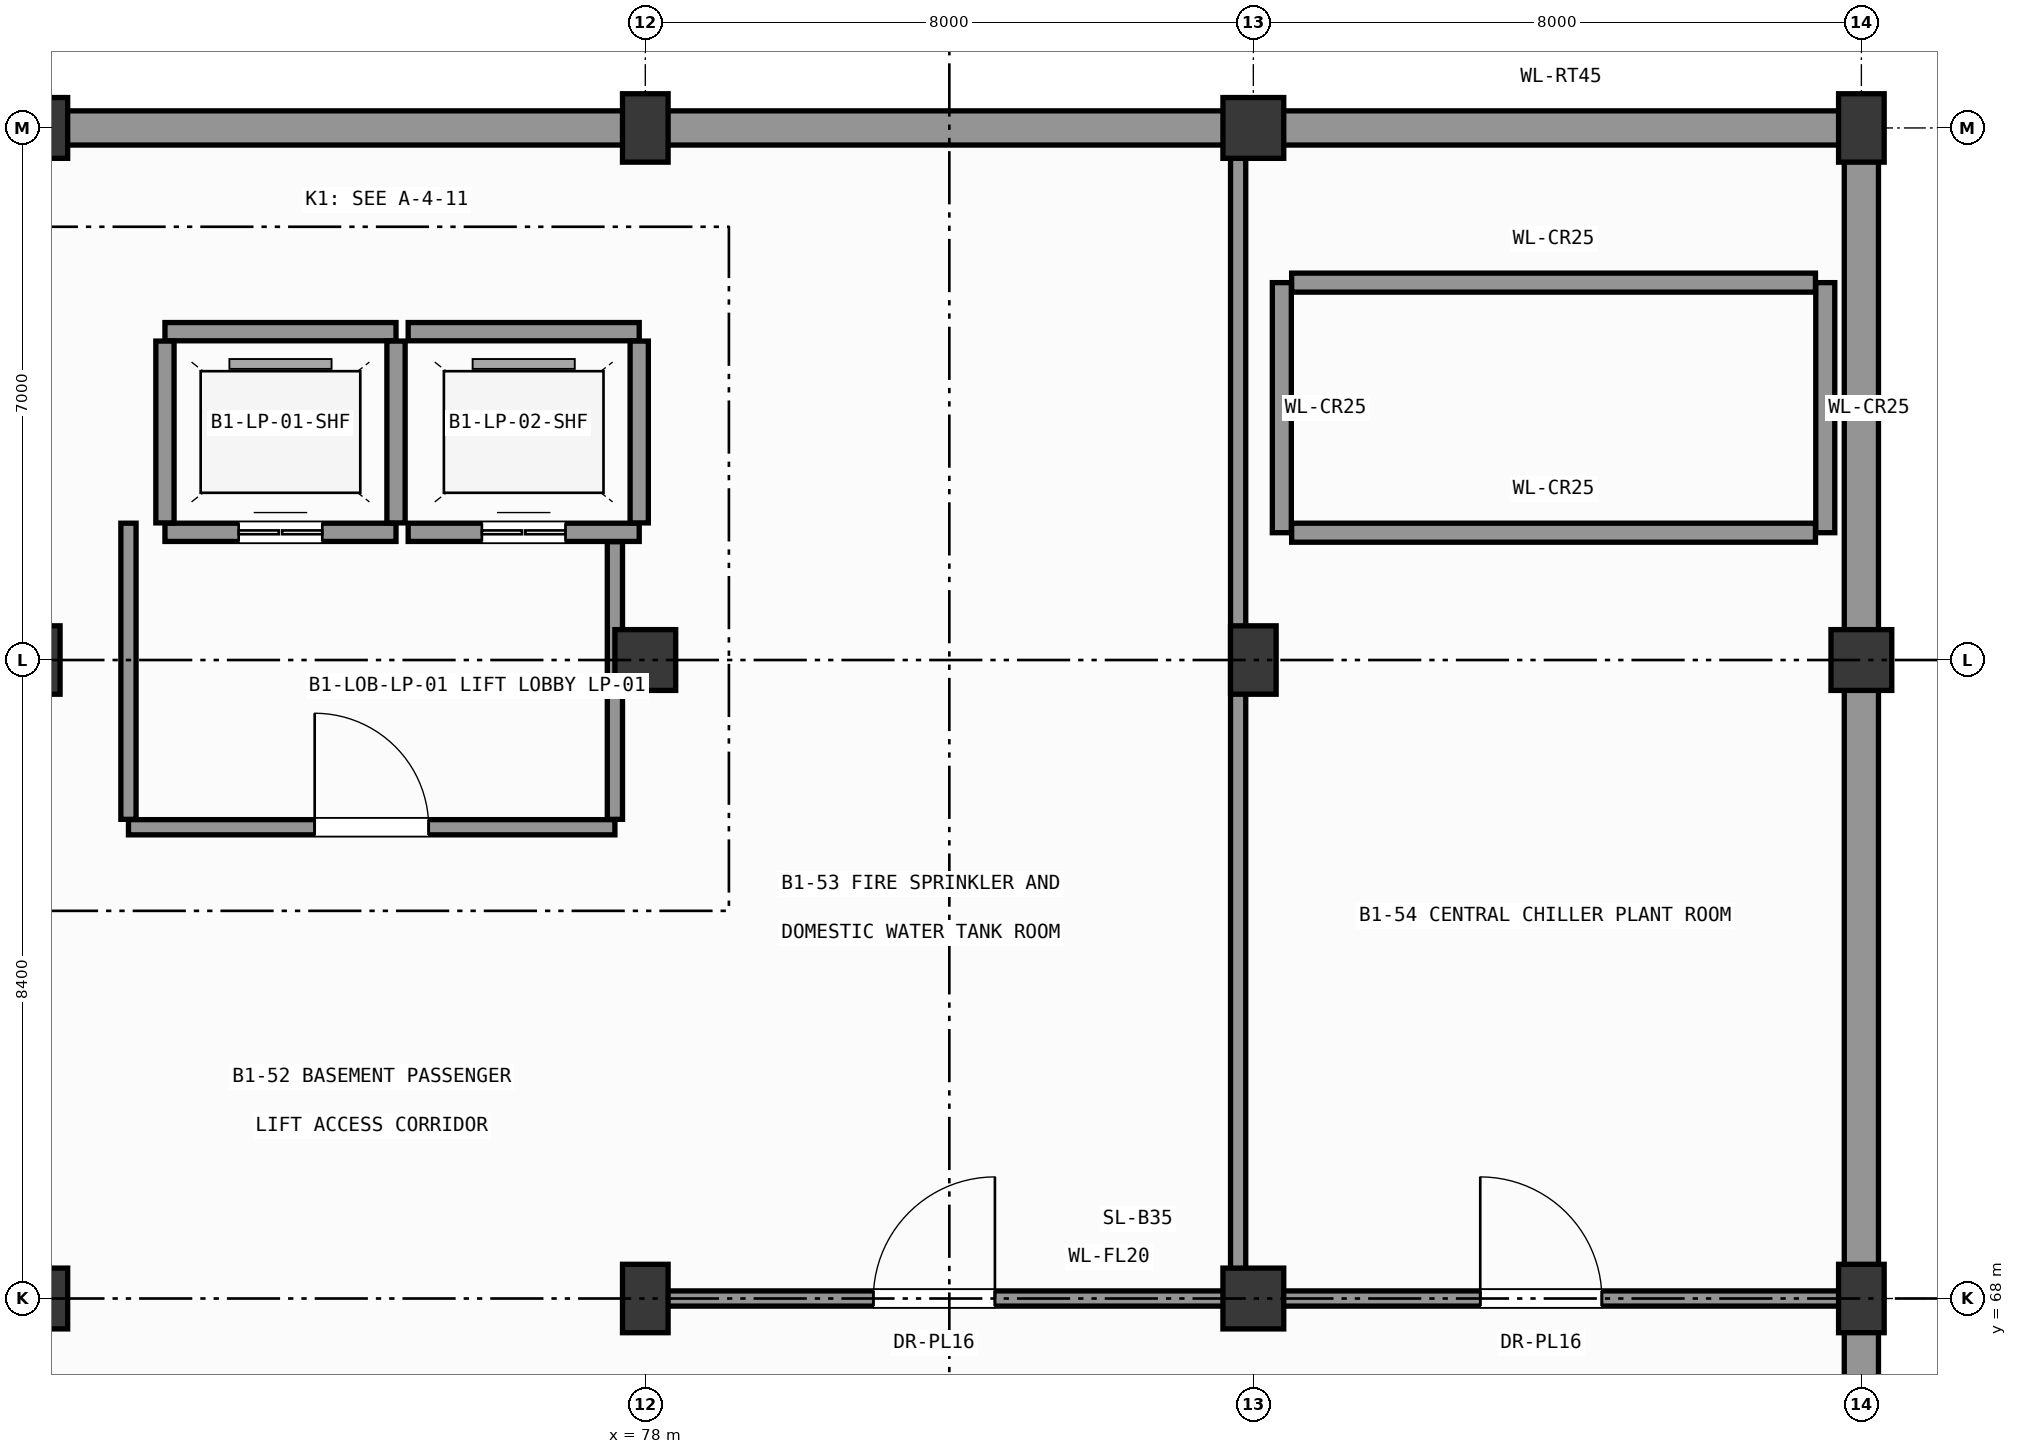
"""IFC4 building model, lengths in metres.
Left out: names, types, materials, properties, quantities, classifications, styles, units other than length and angle.
Written with IfcOpenShell. Run it as: python <this file> out.ifc"""

import sys

from ifc_helpers import new_model, si_unit, direction, frame, frame_2d, origin, origin_2d, place, context, subcontext, project, spatial, rectangle, extrude, element, fill, save


model = new_model("IFC4")
c1 = context("Model", 3, precision=1e-05, world=origin(), true_north=direction((0.0, 1.0)))
c2 = subcontext(c1, "Body", "Model", "MODEL_VIEW")
j1 = project(units=[si_unit("LENGTHUNIT", "METRE"), si_unit("PLANEANGLEUNIT", "RADIAN")], contexts=[c1])
p1 = place(None, origin())
s1 = spatial("IfcSite", under=j1, at=p1, CompositionType="ELEMENT")
p2 = place(p1, origin())
s2 = spatial("IfcBuilding", under=s1, at=p2, CompositionType="ELEMENT")
p3 = place(p2, frame((0.0, 0.0, -4.8)))
s3 = spatial("IfcBuildingStorey", under=s2, at=p3, CompositionType="ELEMENT", Elevation=-4.8)
p4 = place(p3, frame((70.0, 68.0, 0.0), z_axis=(0.0, 0.0, 1.0), x_axis=(1.0, 0.0, 0.0)))
e1 = element("IfcColumn", 1, at=p4, inside=s3, PredefinedType="COLUMN", context=c2, shape_type="SweptSolid", body=[
    extrude(rectangle(XDim=0.8, YDim=0.8, at=origin_2d()), origin(), (0.0, 0.0, 1.0), 4.8),
])
p5 = place(p3, frame((70.0, 76.4, 0.0), z_axis=(0.0, 0.0, 1.0), x_axis=(1.0, 0.0, 0.0)))
e2 = element("IfcColumn", 2, at=p5, inside=s3, PredefinedType="COLUMN", context=c2, shape_type="SweptSolid", body=[
    extrude(rectangle(XDim=0.6, YDim=0.9, at=origin_2d()), origin(), (0.0, 0.0, 1.0), 4.8),
])
p6 = place(p3, frame((70.0, 83.4, 0.0), z_axis=(0.0, 0.0, 1.0), x_axis=(1.0, 0.0, 0.0)))
e3 = element("IfcColumn", 3, at=p6, inside=s3, PredefinedType="COLUMN", context=c2, shape_type="SweptSolid", body=[
    extrude(rectangle(XDim=0.8, YDim=0.8, at=origin_2d()), origin(), (0.0, 0.0, 1.0), 4.8),
])
p7 = place(p3, frame((78.0, 68.0, 0.0), z_axis=(0.0, 0.0, 1.0), x_axis=(1.0, 0.0, 0.0)))
e4 = element("IfcColumn", 4, at=p7, inside=s3, PredefinedType="COLUMN", context=c2, shape_type="SweptSolid", body=[
    extrude(rectangle(XDim=0.6, YDim=0.9, at=origin_2d()), origin(), (0.0, 0.0, 1.0), 4.8),
])
p8 = place(p3, frame((78.0, 76.4, 0.0), z_axis=(0.0, 0.0, 1.0), x_axis=(1.0, 0.0, 0.0)))
e5 = element("IfcColumn", 5, at=p8, inside=s3, PredefinedType="COLUMN", context=c2, shape_type="SweptSolid", body=[
    extrude(rectangle(XDim=0.8, YDim=0.8, at=origin_2d()), origin(), (0.0, 0.0, 1.0), 4.8),
])
p9 = place(p3, frame((78.0, 83.4, 0.0), z_axis=(0.0, 0.0, 1.0), x_axis=(1.0, 0.0, 0.0)))
e6 = element("IfcColumn", 6, at=p9, inside=s3, PredefinedType="COLUMN", context=c2, shape_type="SweptSolid", body=[
    extrude(rectangle(XDim=0.6, YDim=0.9, at=origin_2d()), origin(), (0.0, 0.0, 1.0), 4.8),
])
p10 = place(p3, frame((86.0, 68.0, 0.0), z_axis=(0.0, 0.0, 1.0), x_axis=(1.0, 0.0, 0.0)))
e7 = element("IfcColumn", 7, at=p10, inside=s3, PredefinedType="COLUMN", context=c2, shape_type="SweptSolid", body=[
    extrude(rectangle(XDim=0.8, YDim=0.8, at=origin_2d()), origin(), (0.0, 0.0, 1.0), 4.8),
])
p11 = place(p3, frame((86.0, 76.4, 0.0), z_axis=(0.0, 0.0, 1.0), x_axis=(1.0, 0.0, 0.0)))
e8 = element("IfcColumn", 8, at=p11, inside=s3, PredefinedType="COLUMN", context=c2, shape_type="SweptSolid", body=[
    extrude(rectangle(XDim=0.6, YDim=0.9, at=origin_2d()), origin(), (0.0, 0.0, 1.0), 4.8),
])
p12 = place(p3, frame((86.0, 83.4, 0.0), z_axis=(0.0, 0.0, 1.0), x_axis=(1.0, 0.0, 0.0)))
e9 = element("IfcColumn", 9, at=p12, inside=s3, PredefinedType="COLUMN", context=c2, shape_type="SweptSolid", body=[
    extrude(rectangle(XDim=0.8, YDim=0.8, at=origin_2d()), origin(), (0.0, 0.0, 1.0), 4.8),
])
p13 = place(p3, frame((94.0, 68.0, 0.0), z_axis=(0.0, 0.0, 1.0), x_axis=(1.0, 0.0, 0.0)))
e10 = element("IfcColumn", 10, at=p13, inside=s3, PredefinedType="COLUMN", context=c2, shape_type="SweptSolid", body=[
    extrude(rectangle(XDim=0.6, YDim=0.9, at=origin_2d()), origin(), (0.0, 0.0, 1.0), 4.8),
])
p14 = place(p3, frame((94.0, 76.4, 0.0), z_axis=(0.0, 0.0, 1.0), x_axis=(1.0, 0.0, 0.0)))
e11 = element("IfcColumn", 11, at=p14, inside=s3, PredefinedType="COLUMN", context=c2, shape_type="SweptSolid", body=[
    extrude(rectangle(XDim=0.8, YDim=0.8, at=origin_2d()), origin(), (0.0, 0.0, 1.0), 4.8),
])
p15 = place(p3, frame((94.0, 83.4, 0.0), z_axis=(0.0, 0.0, 1.0), x_axis=(1.0, 0.0, 0.0)))
e12 = element("IfcColumn", 12, at=p15, inside=s3, PredefinedType="COLUMN", context=c2, shape_type="SweptSolid", body=[
    extrude(rectangle(XDim=0.6, YDim=0.9, at=origin_2d()), origin(), (0.0, 0.0, 1.0), 4.8),
])
p16 = place(p3, frame((94.0, 68.0, 0.0), z_axis=(0.0, 0.0, 1.0), x_axis=(0.0, -1.0, 0.0)))
e13 = element("IfcWall", 13, at=p16, inside=s3, PredefinedType="USERDEFINED", context=c2, shape_type="SweptSolid", body=[
    extrude(rectangle(XDim=3.649, YDim=0.45, at=frame_2d((1.824, 0.0))), origin(), (0.0, 0.0, 1.0), 4.5),
])
p17 = place(p3, frame((94.0, 76.4, 0.0), z_axis=(0.0, 0.0, 1.0), x_axis=(0.0, -1.0, 0.0)))
e14 = element("IfcWall", 14, at=p17, inside=s3, PredefinedType="USERDEFINED", context=c2, shape_type="SweptSolid", body=[
    extrude(rectangle(XDim=8.4, YDim=0.45, at=frame_2d((4.2, 0.0))), origin(), (0.0, 0.0, 1.0), 4.5),
])
p18 = place(p3, frame((94.0, 83.4, 0.0), z_axis=(0.0, 0.0, 1.0), x_axis=(0.0, -1.0, 0.0)))
e15 = element("IfcWall", 15, at=p18, inside=s3, PredefinedType="USERDEFINED", context=c2, shape_type="SweptSolid", body=[
    extrude(rectangle(XDim=7.0, YDim=0.45, at=frame_2d((3.5, 0.0))), origin(), (0.0, 0.0, 1.0), 4.5),
])
p19 = place(p3, frame((86.0, 83.4, 0.0), z_axis=(0.0, 0.0, 1.0), x_axis=(1.0, 0.0, 0.0)))
e16 = element("IfcWall", 16, at=p19, inside=s3, PredefinedType="USERDEFINED", context=c2, shape_type="SweptSolid", body=[
    extrude(rectangle(XDim=7.771, YDim=0.45, at=frame_2d((3.885, 0.0))), origin(), (0.0, 0.0, 1.0), 4.5),
])
for number, where, z_axis, x_axis in (
    (17, (78.0, 83.4, 0.0), (0.0, 0.0, 1.0), (1.0, 0.0, 0.0)),
    (18, (70.0, 83.4, 0.0), (0.0, 0.0, 1.0), (1.0, 0.0, 0.0)),
):
    element("IfcWall", number, at=place(p3, frame(where, z_axis=z_axis, x_axis=x_axis)), inside=s3, PredefinedType="USERDEFINED", context=c2, shape_type="SweptSolid", body=[
        extrude(rectangle(XDim=8.0, YDim=0.45, at=frame_2d((4.0, 0.0))), origin(), (0.0, 0.0, 1.0), 4.5),
    ])
for number, where, z_axis, x_axis in (
    (19, (86.375, 78.075, 0.0), (0.0, 0.0, 1.0), (0.0, 1.0, 0.0)),
    (20, (93.525, 78.075, 0.0), (0.0, 0.0, 1.0), (0.0, 1.0, 0.0)),
):
    element("IfcWall", number, at=place(p3, frame(where, z_axis=z_axis, x_axis=x_axis)), inside=s3, PredefinedType="SHEAR", context=c2, shape_type="SweptSolid", body=[
        extrude(rectangle(XDim=3.29, YDim=0.25, at=frame_2d((1.645, 0.0))), origin(), (0.0, 0.0, 1.0), 4.5),
    ])
for number, where, z_axis, x_axis in (
    (21, (86.504, 78.075, 0.0), (0.0, 0.0, 1.0), (1.0, 0.0, 0.0)),
    (22, (86.504, 81.365, 0.0), (0.0, 0.0, 1.0), (1.0, 0.0, 0.0)),
):
    element("IfcWall", number, at=place(p3, frame(where, z_axis=z_axis, x_axis=x_axis)), inside=s3, PredefinedType="SHEAR", context=c2, shape_type="SweptSolid", body=[
        extrude(rectangle(XDim=6.892, YDim=0.25, at=frame_2d((3.446, 0.0))), origin(), (0.0, 0.0, 1.0), 4.5),
    ])
p20 = place(p3, frame((71.68, 78.08, 0.0), z_axis=(0.0, 0.0, 1.0), x_axis=(1.0, 0.0, 0.0)))
e23 = element("IfcWall", 23, at=p20, inside=s3, PredefinedType="SHEAR", context=c2, shape_type="SweptSolid", body=[
    extrude(rectangle(XDim=3.04, YDim=0.24, at=frame_2d((1.52, 0.0))), origin(), (0.0, 0.0, 1.0), 4.5),
])
p21 = place(p20, frame((0.97, 0.0, 0.0)))
e24 = element("IfcOpeningElement", 24, at=p21, cuts=e23, PredefinedType="OPENING", context=c2, shape_type="SweptSolid", body=[
    extrude(rectangle(XDim=1.1, YDim=2.2, at=frame_2d((0.55, 1.1))), frame((0.0, 0.13, 0.0), z_axis=(0.0, -1.0, 0.0), x_axis=(1.0, 0.0, 0.0)), (0.0, 0.0, 1.0), 0.26),
])
p22 = place(p3, frame((71.68, 80.72, 0.0), z_axis=(0.0, 0.0, 1.0), x_axis=(1.0, 0.0, 0.0)))
e25 = element("IfcWall", 25, at=p22, inside=s3, PredefinedType="SHEAR", context=c2, shape_type="SweptSolid", body=[
    extrude(rectangle(XDim=3.04, YDim=0.24, at=frame_2d((1.52, 0.0))), origin(), (0.0, 0.0, 1.0), 4.5),
])
for number, where, z_axis, x_axis in (
    (26, (71.68, 78.204, 0.0), (0.0, 0.0, 1.0), (0.0, 1.0, 0.0)),
    (27, (74.72, 78.204, 0.0), (0.0, 0.0, 1.0), (0.0, 1.0, 0.0)),
):
    element("IfcWall", number, at=place(p3, frame(where, z_axis=z_axis, x_axis=x_axis)), inside=s3, PredefinedType="SHEAR", context=c2, shape_type="SweptSolid", body=[
        extrude(rectangle(XDim=2.392, YDim=0.24, at=frame_2d((1.196, 0.0))), origin(), (0.0, 0.0, 1.0), 4.5),
    ])
p23 = place(p3, frame((74.88, 78.08, 0.0), z_axis=(0.0, 0.0, 1.0), x_axis=(1.0, 0.0, 0.0)))
e28 = element("IfcWall", 28, at=p23, inside=s3, PredefinedType="SHEAR", context=c2, shape_type="SweptSolid", body=[
    extrude(rectangle(XDim=3.04, YDim=0.24, at=frame_2d((1.52, 0.0))), origin(), (0.0, 0.0, 1.0), 4.5),
])
p24 = place(p23, frame((0.97, 0.0, 0.0)))
e29 = element("IfcOpeningElement", 29, at=p24, cuts=e28, PredefinedType="OPENING", context=c2, shape_type="SweptSolid", body=[
    extrude(rectangle(XDim=1.1, YDim=2.2, at=frame_2d((0.55, 1.1))), frame((0.0, 0.13, 0.0), z_axis=(0.0, -1.0, 0.0), x_axis=(1.0, 0.0, 0.0)), (0.0, 0.0, 1.0), 0.26),
])
p25 = place(p3, frame((74.88, 80.72, 0.0), z_axis=(0.0, 0.0, 1.0), x_axis=(1.0, 0.0, 0.0)))
e30 = element("IfcWall", 30, at=p25, inside=s3, PredefinedType="SHEAR", context=c2, shape_type="SweptSolid", body=[
    extrude(rectangle(XDim=3.04, YDim=0.24, at=frame_2d((1.52, 0.0))), origin(), (0.0, 0.0, 1.0), 4.5),
])
p26 = place(p3, frame((77.92, 78.204, 0.0), z_axis=(0.0, 0.0, 1.0), x_axis=(0.0, 1.0, 0.0)))
e31 = element("IfcWall", 31, at=p26, inside=s3, PredefinedType="SHEAR", context=c2, shape_type="SweptSolid", body=[
    extrude(rectangle(XDim=2.392, YDim=0.24, at=frame_2d((1.196, 0.0))), origin(), (0.0, 0.0, 1.0), 4.5),
])
p27 = place(p3, frame((71.2, 74.2, 0.0), z_axis=(0.0, 0.0, 1.0), x_axis=(1.0, 0.0, 0.0)))
e32 = element("IfcWall", 32, at=p27, inside=s3, PredefinedType="PARTITIONING", context=c2, shape_type="SweptSolid", body=[
    extrude(rectangle(XDim=6.4, YDim=0.2, at=frame_2d((3.2, 0.0))), origin(), (0.0, 0.0, 1.0), 4.5),
])
p28 = place(p27, frame((2.45, 0.0, 0.0)))
e33 = element("IfcOpeningElement", 33, at=p28, cuts=e32, PredefinedType="OPENING", context=c2, shape_type="SweptSolid", body=[
    extrude(rectangle(XDim=1.5, YDim=2.2, at=frame_2d((0.75, 1.1))), frame((0.0, 0.11, 0.0), z_axis=(0.0, -1.0, 0.0), x_axis=(1.0, 0.0, 0.0)), (0.0, 0.0, 1.0), 0.22),
])
p29 = place(p3, frame((71.2, 74.304, 0.0), z_axis=(0.0, 0.0, 1.0), x_axis=(0.0, 1.0, 0.0)))
e34 = element("IfcWall", 34, at=p29, inside=s3, PredefinedType="PARTITIONING", context=c2, shape_type="SweptSolid", body=[
    extrude(rectangle(XDim=3.896, YDim=0.2, at=frame_2d((1.948, 0.0))), origin(), (0.0, 0.0, 1.0), 4.5),
])
p30 = place(p3, frame((77.6, 74.304, 0.0), z_axis=(0.0, 0.0, 1.0), x_axis=(0.0, 1.0, 0.0)))
e35 = element("IfcWall", 35, at=p30, inside=s3, PredefinedType="PARTITIONING", context=c2, shape_type="SweptSolid", body=[
    extrude(rectangle(XDim=3.652, YDim=0.2, at=frame_2d((1.826, 0.0))), origin(), (0.0, 0.0, 1.0), 4.5),
])
p31 = place(p3, frame((77.8, 68.0, 0.0), z_axis=(0.0, 0.0, 1.0), x_axis=(1.0, 0.0, 0.0)))
e36 = element("IfcWall", 36, at=p31, inside=s3, PredefinedType="PARTITIONING", context=c2, shape_type="SweptSolid", body=[
    extrude(rectangle(XDim=8.0, YDim=0.2, at=frame_2d((4.0, 0.0))), origin(), (0.0, 0.0, 1.0), 4.165),
])
p32 = place(p31, frame((3.2, 0.0, 0.0)))
e37 = element("IfcOpeningElement", 37, at=p32, cuts=e36, PredefinedType="OPENING", context=c2, shape_type="SweptSolid", body=[
    extrude(rectangle(XDim=1.6, YDim=2.3, at=frame_2d((0.8, 1.15))), frame((0.0, 0.11, 0.0), z_axis=(0.0, -1.0, 0.0), x_axis=(1.0, 0.0, 0.0)), (0.0, 0.0, 1.0), 0.22),
])
p33 = place(p3, frame((85.8, 68.0, 0.0), z_axis=(0.0, 0.0, 1.0), x_axis=(1.0, 0.0, 0.0)))
e38 = element("IfcWall", 38, at=p33, inside=s3, PredefinedType="PARTITIONING", context=c2, shape_type="SweptSolid", body=[
    extrude(rectangle(XDim=7.971, YDim=0.2, at=frame_2d((3.985, 0.0))), origin(), (0.0, 0.0, 1.0), 4.085),
])
p34 = place(p33, frame((3.186, 0.0, 0.0)))
e39 = element("IfcOpeningElement", 39, at=p34, cuts=e38, PredefinedType="OPENING", context=c2, shape_type="SweptSolid", body=[
    extrude(rectangle(XDim=1.6, YDim=2.3, at=frame_2d((0.8, 1.15))), frame((0.0, 0.11, 0.0), z_axis=(0.0, -1.0, 0.0), x_axis=(1.0, 0.0, 0.0)), (0.0, 0.0, 1.0), 0.22),
])
p35 = place(p3, frame((85.8, 68.104, 0.0), z_axis=(0.0, 0.0, 1.0), x_axis=(0.0, 1.0, 0.0)))
e40 = element("IfcWall", 40, at=p35, inside=s3, PredefinedType="PARTITIONING", context=c2, shape_type="SweptSolid", body=[
    extrude(rectangle(XDim=15.067, YDim=0.2, at=frame_2d((7.533, 0.0))), origin(), (0.0, 0.0, 1.0), 4.045),
])
p36 = place(p21, origin())
e41 = element("IfcDoor", 41, at=p36, inside=s3, OperationType="DOUBLE_DOOR_SLIDING", PredefinedType="DOOR", context=c2, shape_type="SweptSolid", body=[
    extrude(rectangle(XDim=1.1, YDim=2.2, at=frame_2d((0.55, 1.1))), frame((0.0, 0.025, 0.0), z_axis=(0.0, -1.0, 0.0), x_axis=(1.0, 0.0, 0.0)), (0.0, 0.0, 1.0), 0.05),
])
fill(e24, e41)
p37 = place(p24, origin())
e42 = element("IfcDoor", 42, at=p37, inside=s3, OperationType="DOUBLE_DOOR_SLIDING", PredefinedType="DOOR", context=c2, shape_type="SweptSolid", body=[
    extrude(rectangle(XDim=1.1, YDim=2.2, at=frame_2d((0.55, 1.1))), frame((0.0, 0.025, 0.0), z_axis=(0.0, -1.0, 0.0), x_axis=(1.0, 0.0, 0.0)), (0.0, 0.0, 1.0), 0.05),
])
fill(e29, e42)
p38 = place(p28, origin())
e43 = element("IfcDoor", 43, at=p38, inside=s3, OperationType="SINGLE_SWING_LEFT", PredefinedType="DOOR", context=c2, shape_type="SweptSolid", body=[
    extrude(rectangle(XDim=1.5, YDim=2.2, at=frame_2d((0.75, 1.1))), frame((0.0, 0.025, 0.0), z_axis=(0.0, -1.0, 0.0), x_axis=(1.0, 0.0, 0.0)), (0.0, 0.0, 1.0), 0.05),
])
fill(e33, e43)
p39 = place(p32, origin())
e44 = element("IfcDoor", 44, at=p39, inside=s3, OperationType="SINGLE_SWING_RIGHT", PredefinedType="DOOR", context=c2, shape_type="SweptSolid", body=[
    extrude(rectangle(XDim=1.6, YDim=2.3, at=frame_2d((0.8, 1.15))), frame((0.0, 0.025, 0.0), z_axis=(0.0, -1.0, 0.0), x_axis=(1.0, 0.0, 0.0)), (0.0, 0.0, 1.0), 0.05),
])
fill(e37, e44)
p40 = place(p34, origin())
e45 = element("IfcDoor", 45, at=p40, inside=s3, OperationType="SINGLE_SWING_LEFT", PredefinedType="DOOR", context=c2, shape_type="SweptSolid", body=[
    extrude(rectangle(XDim=1.6, YDim=2.3, at=frame_2d((0.8, 1.15))), frame((0.0, 0.025, 0.0), z_axis=(0.0, -1.0, 0.0), x_axis=(1.0, 0.0, 0.0)), (0.0, 0.0, 1.0), 0.05),
])
fill(e39, e45)
save(model, sys.argv[1])
